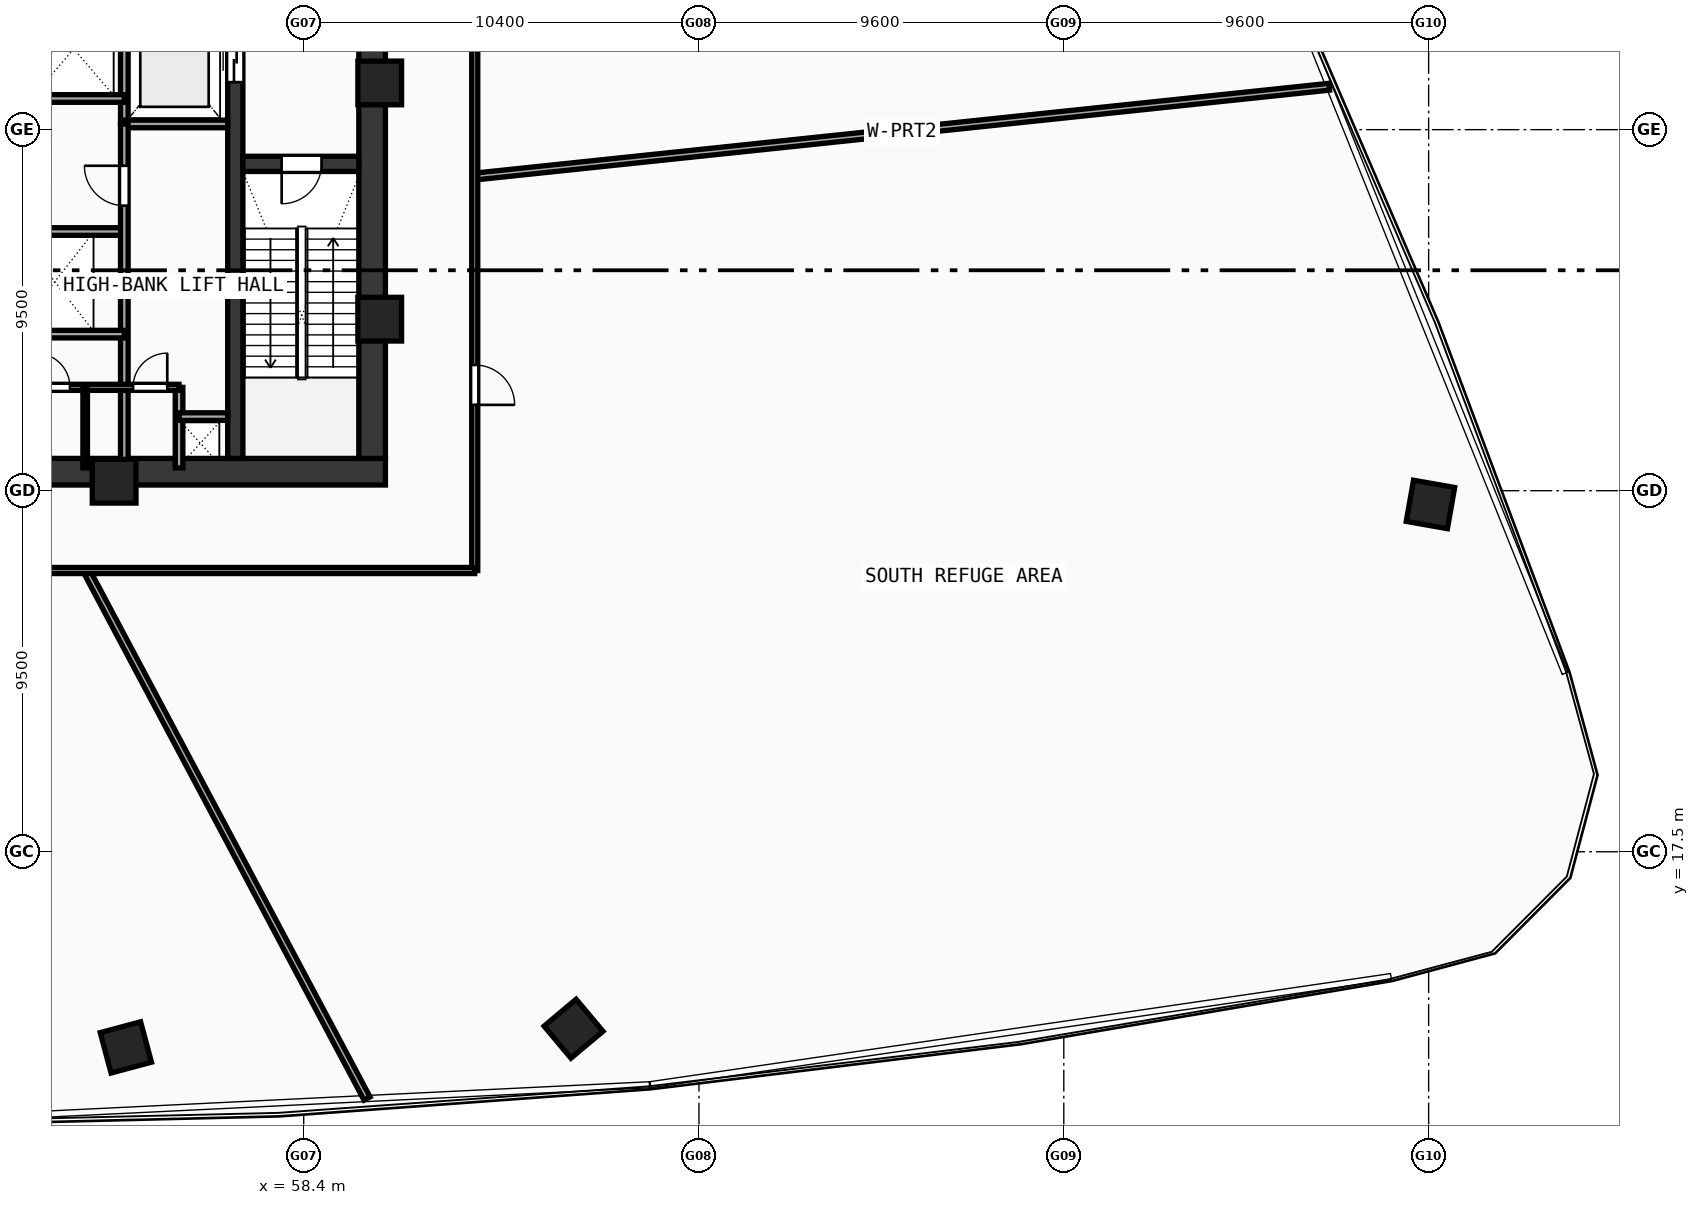
"""IFC4 building model, lengths in metres.
Left out: names, types, materials, properties, quantities, classifications, styles, units other than length and angle.
Written with IfcOpenShell. Run it as: python <this file> out.ifc"""

import sys

from ifc_helpers import new_model, si_unit, direction, frame, frame_2d, origin, origin_with_axes, origin_2d, place, context, subcontext, project, spatial, rectangle, hollow_rectangle, extrude, source, transform, mapped, element, fill, save


model = new_model("IFC4")
c1 = context("Model", 3, precision=1e-05, world=origin(), true_north=direction((0.0, 1.0)))
c2 = subcontext(c1, "Body", "Model", "MODEL_VIEW")
j1 = project(units=[si_unit("LENGTHUNIT", "METRE"), si_unit("PLANEANGLEUNIT", "RADIAN")], contexts=[c1])
p1 = place(None, origin())
s1 = spatial("IfcSite", under=j1, at=p1, CompositionType="ELEMENT")
p2 = place(p1, origin())
s2 = spatial("IfcBuilding", under=s1, at=p2, CompositionType="ELEMENT")
p3 = place(p2, frame((0.0, 0.0, 25.4)))
s3 = spatial("IfcBuildingStorey", under=s2, at=p3, CompositionType="ELEMENT", Elevation=25.4)
p4 = place(p3, frame((35.45, 27.5, 0.0), z_axis=(0.0, 0.0, 1.0), x_axis=(1.0, 0.0, 0.0)))
e1 = element("IfcWall", 1, at=p4, inside=s3, PredefinedType="SHEAR", context=c2, shape_type="SweptSolid", body=[
    extrude(rectangle(XDim=25.1, YDim=0.7, at=frame_2d((12.55, 0.0))), origin(), (0.0, 0.0, 1.0), 4.74),
])
p5 = place(p3, frame((60.2, 27.85, 0.0), z_axis=(0.0, 0.0, 1.0), x_axis=(0.0, 1.0, 0.0)))
e2 = element("IfcWall", 2, at=p5, inside=s3, PredefinedType="SHEAR", context=c2, shape_type="SweptSolid", body=[
    extrude(rectangle(XDim=12.0, YDim=0.7, at=frame_2d((6.0, 0.0))), origin(), (0.0, 0.0, 1.0), 4.74),
])
p6 = place(p3, frame((56.6, 27.85, 0.0), z_axis=(0.0, 0.0, 1.0), x_axis=(0.0, 1.0, 0.0)))
e3 = element("IfcWall", 3, at=p6, inside=s3, PredefinedType="SHEAR", context=c2, shape_type="SweptSolid", body=[
    extrude(rectangle(XDim=12.0, YDim=0.4, at=frame_2d((6.0, 0.0))), origin(), (0.0, 0.0, 1.0), 4.74),
])
p7 = place(p6, frame((9.9, 0.0, 0.0)))
e4 = element("IfcOpeningElement", 4, at=p7, cuts=e3, PredefinedType="OPENING", context=c2, shape_type="SweptSolid", body=[
    extrude(rectangle(XDim=1.1, YDim=2.1, at=frame_2d((0.55, 1.05))), frame((0.0, 0.21, 0.0), z_axis=(0.0, -1.0, 0.0), x_axis=(1.0, 0.0, 0.0)), (0.0, 0.0, 1.0), 0.42),
])
p8 = place(p3, frame((56.8, 35.6, 0.0), z_axis=(0.0, 0.0, 1.0), x_axis=(1.0, 0.0, 0.0)))
e5 = element("IfcWall", 5, at=p8, inside=s3, PredefinedType="SHEAR", context=c2, shape_type="SweptSolid", body=[
    extrude(rectangle(XDim=3.05, YDim=0.4, at=frame_2d((1.525, 0.0))), origin(), (0.0, 0.0, 1.0), 4.74),
])
p9 = place(p8, frame((1.02, 0.0, 0.0)))
e6 = element("IfcOpeningElement", 6, at=p9, cuts=e5, PredefinedType="OPENING", context=c2, shape_type="SweptSolid", body=[
    extrude(rectangle(XDim=1.05, YDim=2.1, at=frame_2d((0.525, 1.05))), frame((0.0, 0.21, 0.0), z_axis=(0.0, -1.0, 0.0), x_axis=(1.0, 0.0, 0.0)), (0.0, 0.0, 1.0), 0.42),
])
m1 = source(origin(), c2, "Body", "SweptSolid", [
    extrude(hollow_rectangle(XDim=1.15, YDim=1.15, WallThickness=0.048, at=origin_2d()), origin(), (0.0, 0.0, 1.0), 5.02),
])
for number, where, z_axis, x_axis in (
    (7, (53.412, 27.25, -0.28), (0.0, 0.0, 1.0), (1.0, 0.0, 0.0)),
    (8, (60.4, 31.513, -0.28), (0.0, 0.0, 1.0), (1.0, 0.0, 0.0)),
    (9, (60.4, 37.729, -0.28), (0.0, 0.0, 1.0), (1.0, 0.0, 0.0)),
):
    element("IfcColumn", number, at=place(p3, frame(where, z_axis=z_axis, x_axis=x_axis)), inside=s3, PredefinedType="COLUMN", context=c2, shape_type="MappedRepresentation", body=[
        mapped(m1, transform((0.0, 0.0, 0.0), scale=1.0)),
    ])
m2 = source(origin(), c2, "Body", "SweptSolid", [
    extrude(hollow_rectangle(XDim=1.1, YDim=1.1, WallThickness=0.045, at=origin_2d()), origin(), (0.0, 0.0, 1.0), 5.02),
])
for number, where, z_axis, x_axis in (
    (10, (53.72, 12.352, -0.28), (0.0, 0.0, 1.0), (0.966, 0.259, 0.0)),
    (11, (65.5, 12.844, -0.28), (0.0, 0.0, 1.0), (0.766, 0.643, 0.0)),
    (12, (88.048, 26.638, -0.28), (0.0, 0.0, 1.0), (0.174, 0.985, 0.0)),
):
    element("IfcColumn", number, at=place(p3, frame(where, z_axis=z_axis, x_axis=x_axis)), inside=s3, PredefinedType="COLUMN", context=c2, shape_type="MappedRepresentation", body=[
        mapped(m2, transform((0.0, 0.0, 0.0), scale=1.0)),
    ])
p10 = place(p3, frame((53.68, 36.65, 0.0), z_axis=(0.0, 0.0, 1.0), x_axis=(0.0, 1.0, 0.0)))
e13 = element("IfcWall", 13, at=p10, inside=s3, PredefinedType="SOLIDWALL", context=c2, shape_type="SweptSolid", body=[
    extrude(rectangle(XDim=3.3, YDim=0.2, at=frame_2d((1.65, 0.0))), origin(), (0.0, 0.0, 1.0), 4.74),
])
p11 = place(p3, frame((53.68, 36.65, 0.0), z_axis=(0.0, 0.0, 1.0), x_axis=(1.0, 0.0, 0.0)))
e14 = element("IfcWall", 14, at=p11, inside=s3, PredefinedType="SOLIDWALL", context=c2, shape_type="SweptSolid", body=[
    extrude(rectangle(XDim=2.72, YDim=0.2, at=frame_2d((1.36, 0.0))), origin(), (0.0, 0.0, 1.0), 4.74),
])
p12 = place(p3, frame((48.95, 37.32, 0.0), z_axis=(0.0, 0.0, 1.0), x_axis=(1.0, 0.0, 0.0)))
e15 = element("IfcWall", 15, at=p12, inside=s3, PredefinedType="SOLIDWALL", context=c2, shape_type="SweptSolid", body=[
    extrude(rectangle(XDim=4.73, YDim=0.2, at=frame_2d((2.365, 0.0))), origin(), (0.0, 0.0, 1.0), 4.74),
])
p13 = place(p3, frame((43.85, 33.82, 0.0), z_axis=(0.0, 0.0, 1.0), x_axis=(1.0, 0.0, 0.0)))
e16 = element("IfcWall", 16, at=p13, inside=s3, PredefinedType="SOLIDWALL", context=c2, shape_type="SweptSolid", body=[
    extrude(rectangle(XDim=9.83, YDim=0.2, at=frame_2d((4.915, 0.0))), origin(), (0.0, 0.0, 1.0), 4.74),
])
p14 = place(p3, frame((53.68, 27.6, 0.0), z_axis=(0.0, 0.0, 1.0), x_axis=(0.0, 1.0, 0.0)))
e17 = element("IfcWall", 17, at=p14, inside=s3, PredefinedType="SOLIDWALL", context=c2, shape_type="SweptSolid", body=[
    extrude(rectangle(XDim=9.05, YDim=0.2, at=frame_2d((4.525, 0.0))), origin(), (0.0, 0.0, 1.0), 4.74),
])
p15 = place(p14, frame((6.9, 0.0, 0.0)))
e18 = element("IfcOpeningElement", 18, at=p15, cuts=e17, PredefinedType="OPENING", context=c2, shape_type="SweptSolid", body=[
    extrude(rectangle(XDim=1.05, YDim=2.1, at=frame_2d((0.525, 1.05))), frame((0.0, 0.11, 0.0), z_axis=(0.0, -1.0, 0.0), x_axis=(1.0, 0.0, 0.0)), (0.0, 0.0, 1.0), 0.22),
])
p16 = place(p3, frame((43.85, 31.12, 0.0), z_axis=(0.0, 0.0, 1.0), x_axis=(1.0, 0.0, 0.0)))
e19 = element("IfcWall", 19, at=p16, inside=s3, PredefinedType="SOLIDWALL", context=c2, shape_type="SweptSolid", body=[
    extrude(rectangle(XDim=9.83, YDim=0.2, at=frame_2d((4.915, 0.0))), origin(), (0.0, 0.0, 1.0), 4.74),
])
p17 = place(p3, frame((55.12, 27.6, 0.0), z_axis=(0.0, 0.0, 1.0), x_axis=(0.0, 1.0, 0.0)))
e20 = element("IfcWall", 20, at=p17, inside=s3, PredefinedType="SOLIDWALL", context=c2, shape_type="SweptSolid", body=[
    extrude(rectangle(XDim=2.12, YDim=0.2, at=frame_2d((1.06, 0.0))), origin(), (0.0, 0.0, 1.0), 4.74),
])
p18 = place(p3, frame((55.12, 28.95, 0.0), z_axis=(0.0, 0.0, 1.0), x_axis=(1.0, 0.0, 0.0)))
e21 = element("IfcWall", 21, at=p18, inside=s3, PredefinedType="SOLIDWALL", context=c2, shape_type="SweptSolid", body=[
    extrude(rectangle(XDim=1.28, YDim=0.2, at=frame_2d((0.64, 0.0))), origin(), (0.0, 0.0, 1.0), 4.74),
])
p19 = place(p3, frame((51.05, 29.72, 0.0), z_axis=(0.0, 0.0, 1.0), x_axis=(1.0, 0.0, 0.0)))
e22 = element("IfcWall", 22, at=p19, inside=s3, PredefinedType="PARTITIONING", context=c2, shape_type="SweptSolid", body=[
    extrude(rectangle(XDim=4.07, YDim=0.16, at=frame_2d((2.035, 0.0))), origin(), (0.0, 0.0, 1.0), 4.74),
])
p20 = place(p19, frame((0.3, 0.0, 0.0)))
e23 = element("IfcOpeningElement", 23, at=p20, cuts=e22, PredefinedType="OPENING", context=c2, shape_type="SweptSolid", body=[
    extrude(rectangle(XDim=0.9, YDim=2.1, at=frame_2d((0.45, 1.05))), frame((0.0, 0.09, 0.0), z_axis=(0.0, -1.0, 0.0), x_axis=(1.0, 0.0, 0.0)), (0.0, 0.0, 1.0), 0.18),
])
p21 = place(p19, frame((2.86, 0.0, 0.0)))
e24 = element("IfcOpeningElement", 24, at=p21, cuts=e22, PredefinedType="OPENING", context=c2, shape_type="SweptSolid", body=[
    extrude(rectangle(XDim=0.9, YDim=2.1, at=frame_2d((0.45, 1.05))), frame((0.0, 0.09, 0.0), z_axis=(0.0, -1.0, 0.0), x_axis=(1.0, 0.0, 0.0)), (0.0, 0.0, 1.0), 0.18),
])
p22 = place(p3, frame((52.65, 27.6, 0.0), z_axis=(0.0, 0.0, 1.0), x_axis=(0.0, 1.0, 0.0)))
e25 = element("IfcWall", 25, at=p22, inside=s3, PredefinedType="PARTITIONING", context=c2, shape_type="SweptSolid", body=[
    extrude(rectangle(XDim=2.12, YDim=0.12, at=frame_2d((1.06, 0.0))), origin(), (0.0, 0.0, 1.0), 4.74),
])
p23 = place(p3, frame((62.9, 35.266, 0.0), z_axis=(0.0, 0.0, 1.0), x_axis=(0.994522243654, 0.104525149493, 0.0)))
e26 = element("IfcWall", 26, at=p23, inside=s3, PredefinedType="PARTITIONING", context=c2, shape_type="SweptSolid", body=[
    extrude(rectangle(XDim=22.61, YDim=0.18, at=frame_2d((11.305, 0.0))), origin(), (0.0, 0.0, 1.0), 4.04),
])
p24 = place(p3, frame((52.679, 24.9, 0.0), z_axis=(0.0, 0.0, 1.0), x_axis=(0.469478899312, -0.88294369192, 0.0)))
e27 = element("IfcWall", 27, at=p24, inside=s3, PredefinedType="PARTITIONING", context=c2, shape_type="SweptSolid", body=[
    extrude(rectangle(XDim=15.734, YDim=0.18, at=frame_2d((7.867, 0.0))), origin(), (0.0, 0.0, 1.0), 4.04),
])
p25 = place(p3, frame((62.9, 42.25, 0.0), z_axis=(0.0, 0.0, 1.0), x_axis=(0.0, -1.0, 0.0)))
e28 = element("IfcWall", 28, at=p25, inside=s3, PredefinedType="PARTITIONING", context=c2, shape_type="SweptSolid", body=[
    extrude(rectangle(XDim=17.35, YDim=0.16, at=frame_2d((8.675, 0.0))), origin(), (0.0, 0.0, 1.0), 4.04),
])
p26 = place(p25, frame((11.942, 0.0, 0.0)))
e29 = element("IfcOpeningElement", 29, at=p26, cuts=e28, PredefinedType="OPENING", context=c2, shape_type="SweptSolid", body=[
    extrude(rectangle(XDim=1.05, YDim=2.1, at=frame_2d((0.525, 1.05))), frame((0.0, 0.09, 0.0), z_axis=(0.0, -1.0, 0.0), x_axis=(1.0, 0.0, 0.0)), (0.0, 0.0, 1.0), 0.18),
])
p27 = place(p3, frame((62.9, 24.9, 0.0), z_axis=(0.0, 0.0, 1.0), x_axis=(-1.0, 0.0, 0.0)))
e30 = element("IfcWall", 30, at=p27, inside=s3, PredefinedType="PARTITIONING", context=c2, shape_type="SweptSolid", body=[
    extrude(rectangle(XDim=29.8, YDim=0.16, at=frame_2d((14.9, 0.0))), origin(), (0.0, 0.0, 1.0), 4.04),
])
p28 = place(p27, frame((14.375, 0.0, 0.0)))
e31 = element("IfcOpeningElement", 31, at=p28, cuts=e30, PredefinedType="OPENING", context=c2, shape_type="SweptSolid", body=[
    extrude(rectangle(XDim=1.05, YDim=2.1, at=frame_2d((0.525, 1.05))), frame((0.0, 0.09, 0.0), z_axis=(0.0, -1.0, 0.0), x_axis=(1.0, 0.0, 0.0)), (0.0, 0.0, 1.0), 0.18),
])
m3 = source(origin(), c2, "Body", "SweptSolid", [
    extrude(rectangle(XDim=1.05, YDim=2.1, at=frame_2d((0.525, 1.05))), frame((0.0, 0.025, 0.0), z_axis=(0.0, -1.0, 0.0), x_axis=(1.0, 0.0, 0.0)), (0.0, 0.0, 1.0), 0.05),
])
p29 = place(p9, frame((1.05, 0.0, 0.0), z_axis=(0.0, 0.0, 1.0), x_axis=(-1.0, 0.0, 0.0)))
e32 = element("IfcDoor", 32, at=p29, inside=s3, OperationType="SINGLE_SWING_RIGHT", PredefinedType="DOOR", context=c2, shape_type="MappedRepresentation", body=[
    mapped(m3, transform((0.0, 0.0, 0.0), scale=1.0)),
])
fill(e6, e32)
m4 = source(origin(), c2, "Body", "SweptSolid", [
    extrude(rectangle(XDim=1.1, YDim=2.1, at=frame_2d((0.55, 1.05))), frame((0.0, 0.025, 0.0), z_axis=(0.0, -1.0, 0.0), x_axis=(1.0, 0.0, 0.0)), (0.0, 0.0, 1.0), 0.05),
])
p30 = place(p7, origin_with_axes())
e33 = element("IfcDoor", 33, at=p30, inside=s3, OperationType="DOUBLE_DOOR_SLIDING", PredefinedType="DOOR", context=c2, shape_type="MappedRepresentation", body=[
    mapped(m4, transform((0.0, 0.0, 0.0), scale=1.0)),
])
fill(e4, e33)
p31 = place(p15, origin_with_axes())
e34 = element("IfcDoor", 34, at=p31, inside=s3, OperationType="SINGLE_SWING_RIGHT", PredefinedType="DOOR", context=c2, shape_type="MappedRepresentation", body=[
    mapped(m3, transform((0.0, 0.0, 0.0), scale=1.0)),
])
fill(e18, e34)
m5 = source(origin(), c2, "Body", "SweptSolid", [
    extrude(rectangle(XDim=0.9, YDim=2.1, at=frame_2d((0.45, 1.05))), frame((0.0, 0.025, 0.0), z_axis=(0.0, -1.0, 0.0), x_axis=(1.0, 0.0, 0.0)), (0.0, 0.0, 1.0), 0.05),
])
p32 = place(p20, origin_with_axes())
e35 = element("IfcDoor", 35, at=p32, inside=s3, OperationType="SINGLE_SWING_LEFT", PredefinedType="DOOR", context=c2, shape_type="MappedRepresentation", body=[
    mapped(m5, transform((0.0, 0.0, 0.0), scale=1.0)),
])
fill(e23, e35)
p33 = place(p21, origin_with_axes())
e36 = element("IfcDoor", 36, at=p33, inside=s3, OperationType="SINGLE_SWING_RIGHT", PredefinedType="DOOR", context=c2, shape_type="MappedRepresentation", body=[
    mapped(m5, transform((0.0, 0.0, 0.0), scale=1.0)),
])
fill(e24, e36)
p34 = place(p26, origin_with_axes())
e37 = element("IfcDoor", 37, at=p34, inside=s3, OperationType="SINGLE_SWING_RIGHT", PredefinedType="DOOR", context=c2, shape_type="MappedRepresentation", body=[
    mapped(m3, transform((0.0, 0.0, 0.0), scale=1.0)),
])
fill(e29, e37)
save(model, sys.argv[1])
